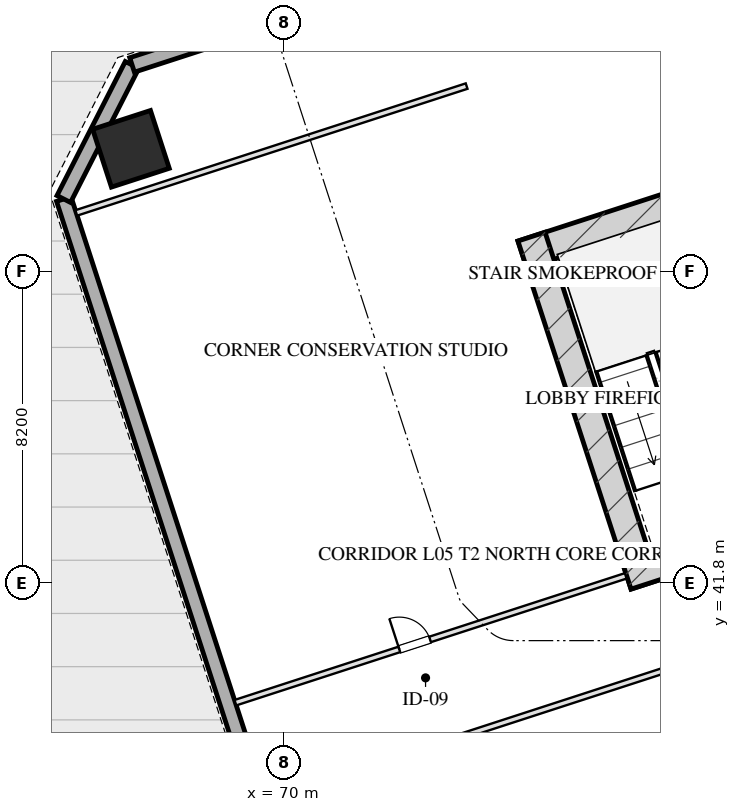
"""IFC4 building model, lengths in metres.
Left out: names, types, materials, properties, quantities, classifications, styles, units other than length and angle.
Written with IfcOpenShell. Run it as: python <this file> out.ifc"""

import sys

from ifc_helpers import new_model, si_unit, direction, frame, frame_2d, origin, origin_2d, place, context, subcontext, project, spatial, rectangle, hollow_rectangle, extrude, element, fill, save


model = new_model("IFC4")
c1 = context("Model", 3, precision=1e-05, world=origin(), true_north=direction((0.0, 1.0)))
c2 = subcontext(c1, "Body", "Model", "MODEL_VIEW")
j1 = project(units=[si_unit("LENGTHUNIT", "METRE"), si_unit("PLANEANGLEUNIT", "RADIAN")], contexts=[c1])
p1 = place(None, origin())
s1 = spatial("IfcSite", under=j1, at=p1, CompositionType="ELEMENT")
p2 = place(p1, origin())
s2 = spatial("IfcBuilding", under=s1, at=p2, CompositionType="ELEMENT")
p3 = place(p2, frame((0.0, 0.0, 26.0)))
s3 = spatial("IfcBuildingStorey", under=s2, at=p3, CompositionType="ELEMENT", Elevation=26.0)
p4 = place(p3, frame((76.272, 50.443, 0.0), z_axis=(0.0, 0.0, 1.0), x_axis=(0.951056072937, 0.309018358888, 0.0)))
e1 = element("IfcWall", 1, at=p4, inside=s3, PredefinedType="SHEAR", context=c2, shape_type="SweptSolid", body=[
    extrude(rectangle(XDim=16.55, YDim=0.75, at=frame_2d((8.275, 0.0))), origin(), (0.0, 0.0, 1.0), 4.0),
])
p5 = place(p3, frame((79.489, 41.756, 0.0), z_axis=(0.0, 0.0, 1.0), x_axis=(-0.309016134813, 0.951056795583, 0.0)))
e2 = element("IfcWall", 2, at=p5, inside=s3, PredefinedType="SHEAR", context=c2, shape_type="SweptSolid", body=[
    extrude(rectangle(XDim=9.63, YDim=0.75, at=frame_2d((4.815, 0.0))), origin(), (0.0, 0.0, 1.0), 4.0),
])
p6 = place(p3, frame((79.016, 41.997, 0.0), z_axis=(0.0, 0.0, 1.0), x_axis=(0.95106038264, 0.309005094736, 0.0)))
e3 = element("IfcWall", 3, at=p6, inside=s3, PredefinedType="SHEAR", context=c2, shape_type="SweptSolid", body=[
    extrude(rectangle(XDim=4.295, YDim=0.75, at=frame_2d((2.147, 0.0))), origin(), (0.0, 0.0, 1.0), 4.0),
])
p7 = place(p3, frame((65.973, 53.226, 0.0), z_axis=(0.0, 0.0, 1.0), x_axis=(0.951056516295, 0.309016994375, 0.0)))
e4 = element("IfcColumn", 4, at=p7, inside=s3, PredefinedType="COLUMN", context=c2, shape_type="SweptSolid", body=[
    extrude(hollow_rectangle(XDim=1.6, YDim=1.6, WallThickness=0.055, at=origin_2d()), origin(), (0.0, 0.0, 1.0), 4.001),
])
p8 = place(p3, frame((79.655, 4.352, 0.0), z_axis=(0.0, 0.0, 1.0), x_axis=(-0.309014526607, 0.951057318118, 0.0)))
e5 = element("IfcWall", 5, at=p8, inside=s3, PredefinedType="SOLIDWALL", context=c2, shape_type="SweptSolid", body=[
    extrude(rectangle(XDim=50.0, YDim=0.4, at=frame_2d((25.0, 0.0))), origin(), (0.0, 0.0, 1.0), 3.16),
])
p9 = place(p8, frame((17.35, 0.0, 0.75)))
e6 = element("IfcOpeningElement", 6, at=p9, cuts=e5, PredefinedType="OPENING", context=c2, shape_type="SweptSolid", body=[
    extrude(rectangle(XDim=2.5, YDim=1.75, at=frame_2d((1.25, 0.875))), frame((0.0, 0.21, 0.0), z_axis=(0.0, -1.0, 0.0), x_axis=(1.0, 0.0, 0.0)), (0.0, 0.0, 1.0), 0.42),
])
p10 = place(p8, frame((21.15, 0.0, 0.75)))
e7 = element("IfcOpeningElement", 7, at=p10, cuts=e5, PredefinedType="OPENING", context=c2, shape_type="SweptSolid", body=[
    extrude(rectangle(XDim=2.5, YDim=1.75, at=frame_2d((1.25, 0.875))), frame((0.0, 0.21, 0.0), z_axis=(0.0, -1.0, 0.0), x_axis=(1.0, 0.0, 0.0)), (0.0, 0.0, 1.0), 0.42),
])
p11 = place(p8, frame((26.35, 0.0, 0.75)))
e8 = element("IfcOpeningElement", 8, at=p11, cuts=e5, PredefinedType="OPENING", context=c2, shape_type="SweptSolid", body=[
    extrude(rectangle(XDim=2.5, YDim=1.75, at=frame_2d((1.25, 0.875))), frame((0.0, 0.21, 0.0), z_axis=(0.0, -1.0, 0.0), x_axis=(1.0, 0.0, 0.0)), (0.0, 0.0, 1.0), 0.42),
])
p12 = place(p8, frame((30.15, 0.0, 0.75)))
e9 = element("IfcOpeningElement", 9, at=p12, cuts=e5, PredefinedType="OPENING", context=c2, shape_type="SweptSolid", body=[
    extrude(rectangle(XDim=2.5, YDim=1.75, at=frame_2d((1.25, 0.875))), frame((0.0, 0.21, 0.0), z_axis=(0.0, -1.0, 0.0), x_axis=(1.0, 0.0, 0.0)), (0.0, 0.0, 1.0), 0.42),
])
p13 = place(p3, frame((64.205, 51.905, 0.0), z_axis=(0.0, 0.0, 1.0), x_axis=(0.453958106755, 0.891023028497, 0.0)))
e10 = element("IfcWall", 10, at=p13, inside=s3, PredefinedType="SOLIDWALL", context=c2, shape_type="SweptSolid", body=[
    extrude(rectangle(XDim=3.96, YDim=0.4, at=frame_2d((1.98, 0.0))), origin(), (0.0, 0.0, 1.0), 3.16),
])
p14 = place(p3, frame((66.002, 55.433, 0.0), z_axis=(0.0, 0.0, 1.0), x_axis=(0.951055939317, 0.309018770125, 0.0)))
e11 = element("IfcWall", 11, at=p14, inside=s3, PredefinedType="SOLIDWALL", context=c2, shape_type="SweptSolid", body=[
    extrude(rectangle(XDim=32.4, YDim=0.4, at=frame_2d((16.2, 0.0))), origin(), (0.0, 0.0, 1.0), 3.16),
])
p15 = place(p3, frame((64.534, 51.539, 0.0), z_axis=(0.0, 0.0, 1.0), x_axis=(0.951056658866, 0.309016555588, 0.0)))
e12 = element("IfcWall", 12, at=p15, inside=s3, PredefinedType="PARTITIONING", context=c2, shape_type="SweptSolid", body=[
    extrude(rectangle(XDim=10.8, YDim=0.15, at=frame_2d((5.4, 0.0))), origin(), (0.0, 0.0, 1.0), 3.725),
])
p16 = place(p3, frame((68.721, 38.652, 0.0), z_axis=(0.0, 0.0, 1.0), x_axis=(0.951056658866, 0.309016555588, 0.0)))
e13 = element("IfcWall", 13, at=p16, inside=s3, PredefinedType="PARTITIONING", context=c2, shape_type="SweptSolid", body=[
    extrude(rectangle(XDim=10.8, YDim=0.15, at=frame_2d((5.4, 0.0))), origin(), (0.0, 0.0, 1.0), 3.725),
])
p17 = place(p16, frame((4.536, 0.0, 0.0)))
e14 = element("IfcOpeningElement", 14, at=p17, cuts=e13, PredefinedType="OPENING", context=c2, shape_type="SweptSolid", body=[
    extrude(rectangle(XDim=0.85, YDim=2.05, at=frame_2d((0.425, 1.025))), frame((0.0, 0.085, 0.0), z_axis=(0.0, -1.0, 0.0), x_axis=(1.0, 0.0, 0.0)), (0.0, 0.0, 1.0), 0.17),
])
p18 = place(p3, frame((69.549, 36.103, 0.0), z_axis=(0.0, 0.0, 1.0), x_axis=(0.951058077006, 0.309012190961, 0.0)))
e15 = element("IfcWall", 15, at=p18, inside=s3, PredefinedType="PARTITIONING", context=c2, shape_type="SweptSolid", body=[
    extrude(rectangle(XDim=13.375, YDim=0.15, at=frame_2d((6.688, 0.0))), origin(), (0.0, 0.0, 1.0), 3.725),
])
p19 = place(p17, origin())
e16 = element("IfcDoor", 16, at=p19, inside=s3, OperationType="SINGLE_SWING_LEFT", PredefinedType="DOOR", context=c2, shape_type="SweptSolid", body=[
    extrude(rectangle(XDim=0.85, YDim=2.05, at=frame_2d((0.425, 1.025))), frame((0.0, 0.025, 0.0), z_axis=(0.0, -1.0, 0.0), x_axis=(1.0, 0.0, 0.0)), (0.0, 0.0, 1.0), 0.05),
])
fill(e14, e16)
save(model, sys.argv[1])
